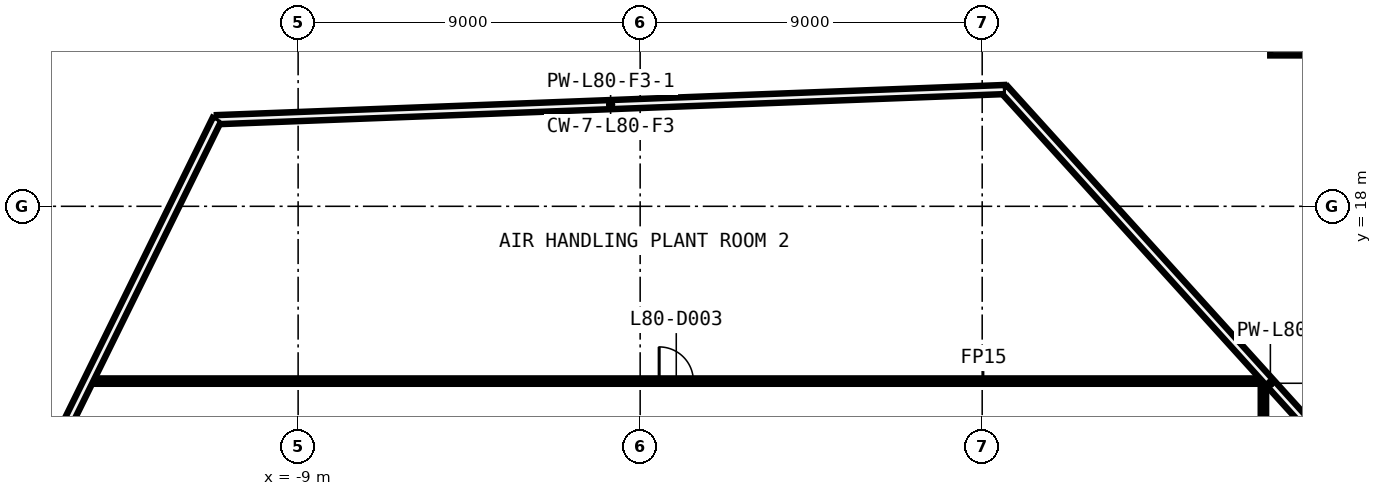
"""IFC4 building model, lengths in metres.
Left out: names, types, materials, properties, quantities, classifications, styles, units other than length and angle.
Written with IfcOpenShell. Run it as: python <this file> out.ifc"""

import sys

from ifc_helpers import new_model, si_unit, direction, frame, frame_2d, origin, origin_2d, place, context, subcontext, project, spatial, rectangle, hollow_rectangle, extrude, element, fill, save


model = new_model("IFC4")
c1 = context("Model", 3, precision=1e-05, world=origin(), true_north=direction((0.0, 1.0)))
c2 = subcontext(c1, "Body", "Model", "MODEL_VIEW")
j1 = project(units=[si_unit("LENGTHUNIT", "METRE"), si_unit("PLANEANGLEUNIT", "RADIAN")], contexts=[c1])
p1 = place(None, origin())
s1 = spatial("IfcSite", under=j1, at=p1, CompositionType="ELEMENT")
p2 = place(p1, origin())
s2 = spatial("IfcBuilding", under=s1, at=p2, CompositionType="ELEMENT")
p3 = place(p2, frame((0.0, 0.0, 371.6)))
s3 = spatial("IfcBuildingStorey", under=s2, at=p3, CompositionType="ELEMENT", Elevation=371.6)
p4 = place(p3, frame((17.276, 22.666, 0.0), z_axis=(0.0, 0.0, 1.0), x_axis=(1.0, 0.0, 0.0)))
e1 = element("IfcColumn", 1, at=p4, inside=s3, PredefinedType="COLUMN", context=c2, shape_type="SweptSolid", body=[
    extrude(hollow_rectangle(XDim=1.4, YDim=1.4, WallThickness=0.06, at=origin_2d()), origin(), (0.0, 0.0, 1.0), 4.2),
])
p5 = place(p3, frame((-14.5, 13.4, 0.0), z_axis=(0.0, 0.0, 1.0), x_axis=(1.0, 0.0, 0.0)))
e2 = element("IfcWall", 2, at=p5, inside=s3, PredefinedType="PARTITIONING", context=c2, shape_type="SweptSolid", body=[
    extrude(rectangle(XDim=30.975, YDim=0.15, at=frame_2d((15.487, 0.0))), origin(), (0.0, 0.0, 1.0), 3.9),
])
p6 = place(p5, frame((15.0, 0.0, 0.0)))
e3 = element("IfcOpeningElement", 3, at=p6, cuts=e2, PredefinedType="OPENING", context=c2, shape_type="SweptSolid", body=[
    extrude(rectangle(XDim=0.9, YDim=2.1, at=frame_2d((0.45, 1.05))), frame((0.0, 0.085, 0.0), z_axis=(0.0, -1.0, 0.0), x_axis=(1.0, 0.0, 0.0)), (0.0, 0.0, 1.0), 0.17),
])
p7 = place(p3, frame((16.4, -9.676, 0.0), z_axis=(0.0, 0.0, 1.0), x_axis=(0.0, 1.0, 0.0)))
e4 = element("IfcWall", 4, at=p7, inside=s3, PredefinedType="PARTITIONING", context=c2, shape_type="SweptSolid", body=[
    extrude(rectangle(XDim=23.001, YDim=0.15, at=frame_2d((11.5, 0.0))), origin(), (0.0, 0.0, 1.0), 3.9),
])
p8 = place(p3, frame((23.583, 5.614, 0.0), z_axis=(0.0, 0.0, 1.0), x_axis=(-0.671256862452, 0.741224813812, 0.0)))
e5 = element("IfcWall", 5, at=p8, inside=s3, PredefinedType="SOLIDWALL", context=c2, shape_type="SweptSolid", body=[
    extrude(rectangle(XDim=20.856, YDim=0.25, at=frame_2d((10.428, 0.0))), origin(), (0.0, 0.0, 1.0), 3.8),
])
p9 = place(p3, frame((9.583, 21.073, 0.0), z_axis=(0.0, 0.0, 1.0), x_axis=(-0.999269048775, -0.038227845343, 0.0)))
e6 = element("IfcWall", 6, at=p9, inside=s3, PredefinedType="SOLIDWALL", context=c2, shape_type="SweptSolid", body=[
    extrude(rectangle(XDim=20.737, YDim=0.25, at=frame_2d((10.368, 0.0))), origin(), (0.0, 0.0, 1.0), 3.8),
])
p10 = place(p3, frame((-11.138, 20.28, 0.0), z_axis=(0.0, 0.0, 1.0), x_axis=(-0.441342255748, -0.897338850876, 0.0)))
e7 = element("IfcWall", 7, at=p10, inside=s3, PredefinedType="SOLIDWALL", context=c2, shape_type="SweptSolid", body=[
    extrude(rectangle(XDim=28.805, YDim=0.25, at=frame_2d((14.403, 0.0))), origin(), (0.0, 0.0, 1.0), 3.8),
])
p11 = place(p6, origin())
e8 = element("IfcDoor", 8, at=p11, inside=s3, OperationType="SINGLE_SWING_RIGHT", PredefinedType="DOOR", context=c2, shape_type="SweptSolid", body=[
    extrude(rectangle(XDim=0.9, YDim=2.1, at=frame_2d((0.45, 1.05))), frame((0.0, 0.025, 0.0), z_axis=(0.0, -1.0, 0.0), x_axis=(1.0, 0.0, 0.0)), (0.0, 0.0, 1.0), 0.05),
])
fill(e3, e8)
save(model, sys.argv[1])
